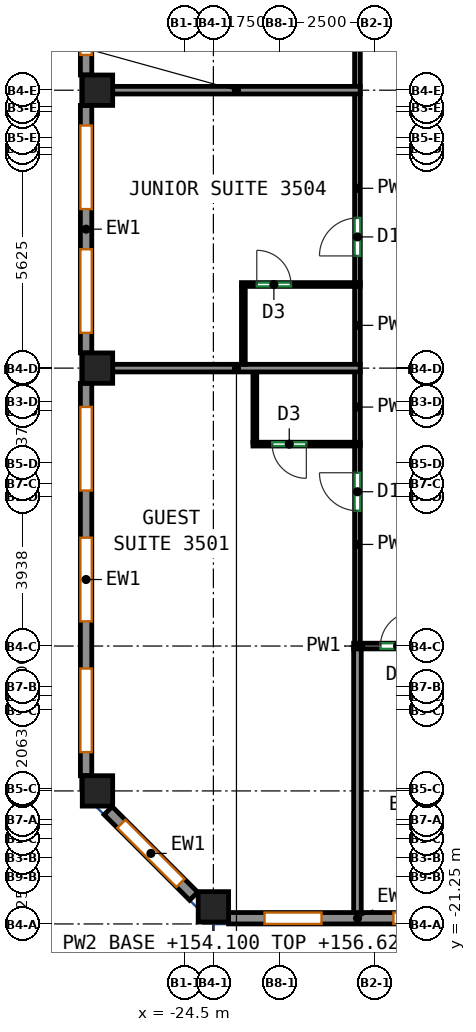
"""IFC4 building model, lengths in metres.
Left out: names, types, materials, properties, quantities, classifications, styles, units other than length and angle.
Written with IfcOpenShell. Run it as: python <this file> out.ifc"""

import sys

from ifc_helpers import new_model, si_unit, direction, frame, frame_2d, origin, origin_2d, place, context, subcontext, project, spatial, rectangle, extrude, source, transform, mapped, element, fill, save


model = new_model("IFC4")
c1 = context("Model", 3, precision=1e-05, world=origin(), true_north=direction((0.0, 1.0)))
c2 = subcontext(c1, "Body", "Model", "MODEL_VIEW")
j1 = project(units=[si_unit("LENGTHUNIT", "METRE"), si_unit("PLANEANGLEUNIT", "RADIAN")], contexts=[c1])
p1 = place(None, origin())
s1 = spatial("IfcSite", under=j1, at=p1, CompositionType="ELEMENT")
p2 = place(p1, origin())
s2 = spatial("IfcBuilding", under=s1, at=p2, CompositionType="ELEMENT")
p3 = place(p2, frame((0.0, 0.0, 154.1)))
s3 = spatial("IfcBuildingStorey", under=s2, at=p3, CompositionType="ELEMENT", Elevation=154.1)
m1 = source(origin(), c2, "Body", "SweptSolid", [
    extrude(rectangle(XDim=0.8, YDim=0.8, at=origin_2d()), origin(), (0.0, 0.0, 1.0), 3.12),
])
for number, where, z_axis, x_axis in (
    (1, (-26.8, -17.75, 0.0), (0.0, 0.0, 1.0), (1.0, 0.0, 0.0)),
    (2, (-26.8, -6.625, 0.0), (0.0, 0.0, 1.0), (1.0, 0.0, 0.0)),
    (3, (-26.8, 0.688, 0.0), (0.0, 0.0, 1.0), (1.0, 0.0, 0.0)),
    (4, (-23.75, -20.8, 0.0), (0.0, 0.0, 1.0), (1.0, 0.0, 0.0)),
):
    element("IfcColumn", number, at=place(p3, frame(where, z_axis=z_axis, x_axis=x_axis)), inside=s3, PredefinedType="COLUMN", context=c2, shape_type="MappedRepresentation", body=[
        mapped(m1, transform((0.0, 0.0, 0.0))),
    ])
m2 = source(origin(), c2, "Body", "SweptSolid", [
    extrude(rectangle(XDim=6.783, YDim=0.3, at=frame_2d((3.392, 0.0))), origin(), (0.0, 0.0, 1.0), 3.12),
])
p4 = place(p3, frame((-23.35, -21.1, 0.0), z_axis=(0.0, 0.0, 1.0), x_axis=(1.0, 0.0, 0.0)))
e5 = element("IfcWall", 5, at=p4, inside=s3, PredefinedType="SOLIDWALL", context=c2, shape_type="MappedRepresentation", body=[
    mapped(m2, transform((0.0, 0.0, 0.0))),
])
p5 = place(p4, frame((0.946, 0.0, 0.85)))
e6 = element("IfcOpeningElement", 6, at=p5, cuts=e5, PredefinedType="OPENING", context=c2, shape_type="SweptSolid", body=[
    extrude(rectangle(XDim=1.5, YDim=1.95, at=frame_2d((0.75, 0.975))), frame((0.0, 0.16, 0.0), z_axis=(0.0, -1.0, 0.0), x_axis=(1.0, 0.0, 0.0)), (0.0, 0.0, 1.0), 0.32),
])
p6 = place(p4, frame((4.337, 0.0, 0.85)))
e7 = element("IfcOpeningElement", 7, at=p6, cuts=e5, PredefinedType="OPENING", context=c2, shape_type="SweptSolid", body=[
    extrude(rectangle(XDim=1.5, YDim=1.95, at=frame_2d((0.75, 0.975))), frame((0.0, 0.16, 0.0), z_axis=(0.0, -1.0, 0.0), x_axis=(1.0, 0.0, 0.0)), (0.0, 0.0, 1.0), 0.32),
])
m3 = source(origin(), c2, "Body", "SweptSolid", [
    extrude(rectangle(XDim=6.513, YDim=0.3, at=frame_2d((3.256, 0.0))), origin(), (0.0, 0.0, 1.0), 3.12),
])
p7 = place(p3, frame((-27.1, 7.6, 0.0), z_axis=(0.0, 0.0, 1.0), x_axis=(0.0, -1.0, 0.0)))
e8 = element("IfcWall", 8, at=p7, inside=s3, PredefinedType="SOLIDWALL", context=c2, shape_type="MappedRepresentation", body=[
    mapped(m3, transform((0.0, 0.0, 0.0))),
])
p8 = place(p7, frame((0.528, 0.0, 0.85)))
e9 = element("IfcOpeningElement", 9, at=p8, cuts=e8, PredefinedType="OPENING", context=c2, shape_type="SweptSolid", body=[
    extrude(rectangle(XDim=2.2, YDim=1.95, at=frame_2d((1.1, 0.975))), frame((0.0, 0.16, 0.0), z_axis=(0.0, -1.0, 0.0), x_axis=(1.0, 0.0, 0.0)), (0.0, 0.0, 1.0), 0.32),
])
p9 = place(p7, frame((3.784, 0.0, 0.85)))
e10 = element("IfcOpeningElement", 10, at=p9, cuts=e8, PredefinedType="OPENING", context=c2, shape_type="SweptSolid", body=[
    extrude(rectangle(XDim=2.2, YDim=1.95, at=frame_2d((1.1, 0.975))), frame((0.0, 0.16, 0.0), z_axis=(0.0, -1.0, 0.0), x_axis=(1.0, 0.0, 0.0)), (0.0, 0.0, 1.0), 0.32),
])
p10 = place(p3, frame((-27.1, 0.288, 0.0), z_axis=(0.0, 0.0, 1.0), x_axis=(0.0, -1.0, 0.0)))
e11 = element("IfcWall", 11, at=p10, inside=s3, PredefinedType="SOLIDWALL", context=c2, shape_type="MappedRepresentation", body=[
    mapped(m3, transform((0.0, 0.0, 0.0))),
])
p11 = place(p10, frame((0.528, 0.0, 0.85)))
e12 = element("IfcOpeningElement", 12, at=p11, cuts=e11, PredefinedType="OPENING", context=c2, shape_type="SweptSolid", body=[
    extrude(rectangle(XDim=2.2, YDim=1.95, at=frame_2d((1.1, 0.975))), frame((0.0, 0.16, 0.0), z_axis=(0.0, -1.0, 0.0), x_axis=(1.0, 0.0, 0.0)), (0.0, 0.0, 1.0), 0.32),
])
p12 = place(p10, frame((3.784, 0.0, 0.85)))
e13 = element("IfcOpeningElement", 13, at=p12, cuts=e11, PredefinedType="OPENING", context=c2, shape_type="SweptSolid", body=[
    extrude(rectangle(XDim=2.2, YDim=1.95, at=frame_2d((1.1, 0.975))), frame((0.0, 0.16, 0.0), z_axis=(0.0, -1.0, 0.0), x_axis=(1.0, 0.0, 0.0)), (0.0, 0.0, 1.0), 0.32),
])
m4 = source(origin(), c2, "Body", "SweptSolid", [
    extrude(rectangle(XDim=10.325, YDim=0.3, at=frame_2d((5.163, 0.0))), origin(), (0.0, 0.0, 1.0), 3.12),
])
p13 = place(p3, frame((-27.1, -7.025, 0.0), z_axis=(0.0, 0.0, 1.0), x_axis=(0.0, -1.0, 0.0)))
e14 = element("IfcWall", 14, at=p13, inside=s3, PredefinedType="SOLIDWALL", context=c2, shape_type="MappedRepresentation", body=[
    mapped(m4, transform((0.0, 0.0, 0.0))),
])
p14 = place(p13, frame((0.621, 0.0, 0.85)))
e15 = element("IfcOpeningElement", 15, at=p14, cuts=e14, PredefinedType="OPENING", context=c2, shape_type="SweptSolid", body=[
    extrude(rectangle(XDim=2.2, YDim=1.95, at=frame_2d((1.1, 0.975))), frame((0.0, 0.16, 0.0), z_axis=(0.0, -1.0, 0.0), x_axis=(1.0, 0.0, 0.0)), (0.0, 0.0, 1.0), 0.32),
])
p15 = place(p13, frame((4.062, 0.0, 0.85)))
e16 = element("IfcOpeningElement", 16, at=p15, cuts=e14, PredefinedType="OPENING", context=c2, shape_type="SweptSolid", body=[
    extrude(rectangle(XDim=2.2, YDim=1.95, at=frame_2d((1.1, 0.975))), frame((0.0, 0.16, 0.0), z_axis=(0.0, -1.0, 0.0), x_axis=(1.0, 0.0, 0.0)), (0.0, 0.0, 1.0), 0.32),
])
p16 = place(p13, frame((7.504, 0.0, 0.85)))
e17 = element("IfcOpeningElement", 17, at=p16, cuts=e14, PredefinedType="OPENING", context=c2, shape_type="SweptSolid", body=[
    extrude(rectangle(XDim=2.2, YDim=1.95, at=frame_2d((1.1, 0.975))), frame((0.0, 0.16, 0.0), z_axis=(0.0, -1.0, 0.0), x_axis=(1.0, 0.0, 0.0)), (0.0, 0.0, 1.0), 0.32),
])
m5 = source(origin(), c2, "Body", "SweptSolid", [
    extrude(rectangle(XDim=3.182, YDim=0.3, at=frame_2d((1.591, 0.0))), origin(), (0.0, 0.0, 1.0), 3.12),
])
p17 = place(p3, frame((-26.519, -18.269, 0.0), z_axis=(0.0, 0.0, 1.0), x_axis=(0.707068419229, -0.707145141063, 0.0)))
e18 = element("IfcWall", 18, at=p17, inside=s3, PredefinedType="SOLIDWALL", context=c2, shape_type="MappedRepresentation", body=[
    mapped(m5, transform((0.0, 0.0, 0.0))),
])
p18 = place(p17, frame((0.491, 0.0, 0.85)))
e19 = element("IfcOpeningElement", 19, at=p18, cuts=e18, PredefinedType="OPENING", context=c2, shape_type="SweptSolid", body=[
    extrude(rectangle(XDim=2.2, YDim=1.95, at=frame_2d((1.1, 0.975))), frame((0.0, 0.16, 0.0), z_axis=(0.0, -1.0, 0.0), x_axis=(1.0, 0.0, 0.0)), (0.0, 0.0, 1.0), 0.32),
])
p19 = place(p3, frame((-20.059, -13.938, 0.0), z_axis=(0.0, 0.0, 1.0), x_axis=(1.0, 0.0, 0.0)))
e20 = element("IfcWall", 20, at=p19, inside=s3, PredefinedType="PARTITIONING", context=c2, shape_type="SweptSolid", body=[
    extrude(rectangle(XDim=2.309, YDim=0.15, at=frame_2d((1.155, 0.0))), origin(), (0.0, 0.0, 1.0), 3.12),
])
p20 = place(p19, frame((0.705, 0.0, 0.0)))
e21 = element("IfcOpeningElement", 21, at=p20, cuts=e20, PredefinedType="OPENING", context=c2, shape_type="SweptSolid", body=[
    extrude(rectangle(XDim=0.9, YDim=2.1, at=frame_2d((0.45, 1.05))), frame((0.0, 0.085, 0.0), z_axis=(0.0, -1.0, 0.0), x_axis=(1.0, 0.0, 0.0)), (0.0, 0.0, 1.0), 0.17),
])
p21 = place(p3, frame((-19.959, -13.863, 0.0), z_axis=(0.0, 0.0, 1.0), x_axis=(0.0, 1.0, 0.0)))
e22 = element("IfcWall", 22, at=p21, inside=s3, PredefinedType="PARTITIONING", context=c2, shape_type="SweptSolid", body=[
    extrude(rectangle(XDim=5.198, YDim=0.15, at=frame_2d((2.599, 0.0))), origin(), (0.0, 0.0, 1.0), 3.12),
])
p22 = place(p21, frame((3.485, 0.0, 0.0)))
e23 = element("IfcOpeningElement", 23, at=p22, cuts=e22, PredefinedType="OPENING", context=c2, shape_type="SweptSolid", body=[
    extrude(rectangle(XDim=1.0, YDim=2.1, at=frame_2d((0.5, 1.05))), frame((0.0, 0.085, 0.0), z_axis=(0.0, -1.0, 0.0), x_axis=(1.0, 0.0, 0.0)), (0.0, 0.0, 1.0), 0.17),
])
p23 = place(p3, frame((-19.959, -8.585, 0.0), z_axis=(0.0, 0.0, 1.0), x_axis=(0.0, 1.0, 0.0)))
e24 = element("IfcWall", 24, at=p23, inside=s3, PredefinedType="PARTITIONING", context=c2, shape_type="SweptSolid", body=[
    extrude(rectangle(XDim=1.87, YDim=0.15, at=frame_2d((0.935, 0.0))), origin(), (0.0, 0.0, 1.0), 3.12),
])
p24 = place(p3, frame((-19.959, -4.385, 0.0), z_axis=(0.0, 0.0, 1.0), x_axis=(0.0, 1.0, 0.0)))
e25 = element("IfcWall", 25, at=p24, inside=s3, PredefinedType="PARTITIONING", context=c2, shape_type="SweptSolid", body=[
    extrude(rectangle(XDim=4.983, YDim=0.15, at=frame_2d((2.491, 0.0))), origin(), (0.0, 0.0, 1.0), 3.12),
])
p25 = place(p24, frame((0.712, 0.0, 0.0)))
e26 = element("IfcOpeningElement", 26, at=p25, cuts=e25, PredefinedType="OPENING", context=c2, shape_type="SweptSolid", body=[
    extrude(rectangle(XDim=1.0, YDim=2.1, at=frame_2d((0.5, 1.05))), frame((0.0, 0.085, 0.0), z_axis=(0.0, -1.0, 0.0), x_axis=(1.0, 0.0, 0.0)), (0.0, 0.0, 1.0), 0.17),
])
p26 = place(p3, frame((-19.959, -6.535, 0.0), z_axis=(0.0, 0.0, 1.0), x_axis=(0.0, 1.0, 0.0)))
e27 = element("IfcWall", 27, at=p26, inside=s3, PredefinedType="PARTITIONING", context=c2, shape_type="SweptSolid", body=[
    extrude(rectangle(XDim=2.07, YDim=0.15, at=frame_2d((1.035, 0.0))), origin(), (0.0, 0.0, 1.0), 3.12),
])
p27 = place(p3, frame((-19.959, 0.778, 0.0), z_axis=(0.0, 0.0, 1.0), x_axis=(0.0, 1.0, 0.0)))
e28 = element("IfcWall", 28, at=p27, inside=s3, PredefinedType="PARTITIONING", context=c2, shape_type="SweptSolid", body=[
    extrude(rectangle(XDim=4.982, YDim=0.15, at=frame_2d((2.491, 0.0))), origin(), (0.0, 0.0, 1.0), 3.12),
])
p28 = place(p27, frame((3.782, 0.0, 0.0)))
e29 = element("IfcOpeningElement", 29, at=p28, cuts=e28, PredefinedType="OPENING", context=c2, shape_type="SweptSolid", body=[
    extrude(rectangle(XDim=1.0, YDim=2.1, at=frame_2d((0.5, 1.05))), frame((0.0, 0.085, 0.0), z_axis=(0.0, -1.0, 0.0), x_axis=(1.0, 0.0, 0.0)), (0.0, 0.0, 1.0), 0.17),
])
p29 = place(p3, frame((-19.959, -21.0, 0.0), z_axis=(0.0, 0.0, 1.0), x_axis=(0.0, 1.0, 0.0)))
e30 = element("IfcWall", 30, at=p29, inside=s3, PredefinedType="PARTITIONING", context=c2, shape_type="SweptSolid", body=[
    extrude(rectangle(XDim=6.985, YDim=0.2, at=frame_2d((3.493, 0.0))), origin(), (0.0, 0.0, 1.0), 3.12),
])
p30 = place(p3, frame((-22.659, -8.575, 0.0), z_axis=(0.0, 0.0, 1.0), x_axis=(0.0, 1.0, 0.0)))
e31 = element("IfcWall", 31, at=p30, inside=s3, PredefinedType="PARTITIONING", context=c2, shape_type="SweptSolid", body=[
    extrude(rectangle(XDim=1.85, YDim=0.1, at=frame_2d((0.925, 0.0))), origin(), (0.0, 0.0, 1.0), 3.12),
])
p31 = place(p3, frame((-19.886, -8.625, 0.0), z_axis=(0.0, 0.0, 1.0), x_axis=(-1.0, 0.0, 0.0)))
e32 = element("IfcWall", 32, at=p31, inside=s3, PredefinedType="PARTITIONING", context=c2, shape_type="SweptSolid", body=[
    extrude(rectangle(XDim=2.823, YDim=0.1, at=frame_2d((1.412, 0.0))), origin(), (0.0, 0.0, 1.0), 3.12),
])
p32 = place(p31, frame((1.418, 0.0, 0.0)))
e33 = element("IfcOpeningElement", 33, at=p32, cuts=e32, PredefinedType="OPENING", context=c2, shape_type="SweptSolid", body=[
    extrude(rectangle(XDim=0.9, YDim=2.1, at=frame_2d((0.45, 1.05))), frame((0.0, 0.06, 0.0), z_axis=(0.0, -1.0, 0.0), x_axis=(1.0, 0.0, 0.0)), (0.0, 0.0, 1.0), 0.12),
])
p33 = place(p3, frame((-26.4, -6.625, 0.0), z_axis=(0.0, 0.0, 1.0), x_axis=(1.0, 0.0, 0.0)))
e34 = element("IfcWall", 34, at=p33, inside=s3, PredefinedType="PARTITIONING", context=c2, shape_type="SweptSolid", body=[
    extrude(rectangle(XDim=6.514, YDim=0.2, at=frame_2d((3.257, 0.0))), origin(), (0.0, 0.0, 1.0), 2.52),
])
p34 = place(p3, frame((-22.961, -6.525, 0.0), z_axis=(0.0, 0.0, 1.0), x_axis=(0.0, 1.0, 0.0)))
e35 = element("IfcWall", 35, at=p34, inside=s3, PredefinedType="PARTITIONING", context=c2, shape_type="SweptSolid", body=[
    extrude(rectangle(XDim=2.05, YDim=0.1, at=frame_2d((1.025, 0.0))), origin(), (0.0, 0.0, 1.0), 3.12),
])
p35 = place(p3, frame((-23.011, -4.425, 0.0), z_axis=(0.0, 0.0, 1.0), x_axis=(1.0, 0.0, 0.0)))
e36 = element("IfcWall", 36, at=p35, inside=s3, PredefinedType="PARTITIONING", context=c2, shape_type="SweptSolid", body=[
    extrude(rectangle(XDim=3.125, YDim=0.1, at=frame_2d((1.562, 0.0))), origin(), (0.0, 0.0, 1.0), 3.12),
])
p36 = place(p35, frame((0.403, 0.0, 0.0)))
e37 = element("IfcOpeningElement", 37, at=p36, cuts=e36, PredefinedType="OPENING", context=c2, shape_type="SweptSolid", body=[
    extrude(rectangle(XDim=0.9, YDim=2.1, at=frame_2d((0.45, 1.05))), frame((0.0, 0.06, 0.0), z_axis=(0.0, -1.0, 0.0), x_axis=(1.0, 0.0, 0.0)), (0.0, 0.0, 1.0), 0.12),
])
p37 = place(p3, frame((-26.4, 0.688, 0.0), z_axis=(0.0, 0.0, 1.0), x_axis=(1.0, 0.0, 0.0)))
e38 = element("IfcWall", 38, at=p37, inside=s3, PredefinedType="PARTITIONING", context=c2, shape_type="SweptSolid", body=[
    extrude(rectangle(XDim=6.514, YDim=0.2, at=frame_2d((3.257, 0.0))), origin(), (0.0, 0.0, 1.0), 2.52),
])
p38 = place(p5, origin())
e39 = element("IfcWindow", 39, at=p38, inside=s3, PartitioningType="SINGLE_PANEL", PredefinedType="WINDOW", context=c2, shape_type="SweptSolid", body=[
    extrude(rectangle(XDim=1.5, YDim=1.95, at=frame_2d((0.75, 0.975))), frame((0.0, 0.03, 0.0), z_axis=(0.0, -1.0, 0.0), x_axis=(1.0, 0.0, 0.0)), (0.0, 0.0, 1.0), 0.06),
])
fill(e6, e39)
p39 = place(p6, origin())
e40 = element("IfcWindow", 40, at=p39, inside=s3, PartitioningType="SINGLE_PANEL", PredefinedType="WINDOW", context=c2, shape_type="SweptSolid", body=[
    extrude(rectangle(XDim=1.5, YDim=1.95, at=frame_2d((0.75, 0.975))), frame((0.0, 0.03, 0.0), z_axis=(0.0, -1.0, 0.0), x_axis=(1.0, 0.0, 0.0)), (0.0, 0.0, 1.0), 0.06),
])
fill(e7, e40)
p40 = place(p9, origin())
e41 = element("IfcWindow", 41, at=p40, inside=s3, PartitioningType="SINGLE_PANEL", PredefinedType="WINDOW", context=c2, shape_type="SweptSolid", body=[
    extrude(rectangle(XDim=2.2, YDim=1.95, at=frame_2d((1.1, 0.975))), frame((0.0, 0.03, 0.0), z_axis=(0.0, -1.0, 0.0), x_axis=(1.0, 0.0, 0.0)), (0.0, 0.0, 1.0), 0.06),
])
fill(e10, e41)
p41 = place(p11, origin())
e42 = element("IfcWindow", 42, at=p41, inside=s3, PartitioningType="SINGLE_PANEL", PredefinedType="WINDOW", context=c2, shape_type="SweptSolid", body=[
    extrude(rectangle(XDim=2.2, YDim=1.95, at=frame_2d((1.1, 0.975))), frame((0.0, 0.03, 0.0), z_axis=(0.0, -1.0, 0.0), x_axis=(1.0, 0.0, 0.0)), (0.0, 0.0, 1.0), 0.06),
])
fill(e12, e42)
p42 = place(p12, origin())
e43 = element("IfcWindow", 43, at=p42, inside=s3, PartitioningType="SINGLE_PANEL", PredefinedType="WINDOW", context=c2, shape_type="SweptSolid", body=[
    extrude(rectangle(XDim=2.2, YDim=1.95, at=frame_2d((1.1, 0.975))), frame((0.0, 0.03, 0.0), z_axis=(0.0, -1.0, 0.0), x_axis=(1.0, 0.0, 0.0)), (0.0, 0.0, 1.0), 0.06),
])
fill(e13, e43)
p43 = place(p14, origin())
e44 = element("IfcWindow", 44, at=p43, inside=s3, PartitioningType="SINGLE_PANEL", PredefinedType="WINDOW", context=c2, shape_type="SweptSolid", body=[
    extrude(rectangle(XDim=2.2, YDim=1.95, at=frame_2d((1.1, 0.975))), frame((0.0, 0.03, 0.0), z_axis=(0.0, -1.0, 0.0), x_axis=(1.0, 0.0, 0.0)), (0.0, 0.0, 1.0), 0.06),
])
fill(e15, e44)
p44 = place(p15, origin())
e45 = element("IfcWindow", 45, at=p44, inside=s3, PartitioningType="SINGLE_PANEL", PredefinedType="WINDOW", context=c2, shape_type="SweptSolid", body=[
    extrude(rectangle(XDim=2.2, YDim=1.95, at=frame_2d((1.1, 0.975))), frame((0.0, 0.03, 0.0), z_axis=(0.0, -1.0, 0.0), x_axis=(1.0, 0.0, 0.0)), (0.0, 0.0, 1.0), 0.06),
])
fill(e16, e45)
p45 = place(p16, origin())
e46 = element("IfcWindow", 46, at=p45, inside=s3, PartitioningType="SINGLE_PANEL", PredefinedType="WINDOW", context=c2, shape_type="SweptSolid", body=[
    extrude(rectangle(XDim=2.2, YDim=1.95, at=frame_2d((1.1, 0.975))), frame((0.0, 0.03, 0.0), z_axis=(0.0, -1.0, 0.0), x_axis=(1.0, 0.0, 0.0)), (0.0, 0.0, 1.0), 0.06),
])
fill(e17, e46)
p46 = place(p18, origin())
e47 = element("IfcWindow", 47, at=p46, inside=s3, PartitioningType="SINGLE_PANEL", PredefinedType="WINDOW", context=c2, shape_type="SweptSolid", body=[
    extrude(rectangle(XDim=2.2, YDim=1.95, at=frame_2d((1.1, 0.975))), frame((0.0, 0.03, 0.0), z_axis=(0.0, -1.0, 0.0), x_axis=(1.0, 0.0, 0.0)), (0.0, 0.0, 1.0), 0.06),
])
fill(e19, e47)
p47 = place(p20, origin())
e48 = element("IfcDoor", 48, at=p47, inside=s3, OperationType="SINGLE_SWING_RIGHT", PredefinedType="DOOR", context=c2, shape_type="SweptSolid", body=[
    extrude(rectangle(XDim=0.9, YDim=2.1, at=frame_2d((0.45, 1.05))), frame((0.0, 0.025, 0.0), z_axis=(0.0, -1.0, 0.0), x_axis=(1.0, 0.0, 0.0)), (0.0, 0.0, 1.0), 0.05),
])
fill(e21, e48)
p48 = place(p22, origin())
e49 = element("IfcDoor", 49, at=p48, inside=s3, OperationType="SINGLE_SWING_RIGHT", PredefinedType="DOOR", context=c2, shape_type="SweptSolid", body=[
    extrude(rectangle(XDim=1.0, YDim=2.1, at=frame_2d((0.5, 1.05))), frame((0.0, 0.025, 0.0), z_axis=(0.0, -1.0, 0.0), x_axis=(1.0, 0.0, 0.0)), (0.0, 0.0, 1.0), 0.05),
])
fill(e23, e49)
p49 = place(p32, origin())
e50 = element("IfcDoor", 50, at=p49, inside=s3, OperationType="SINGLE_SWING_LEFT", PredefinedType="DOOR", context=c2, shape_type="SweptSolid", body=[
    extrude(rectangle(XDim=0.9, YDim=2.1, at=frame_2d((0.45, 1.05))), frame((0.0, 0.025, 0.0), z_axis=(0.0, -1.0, 0.0), x_axis=(1.0, 0.0, 0.0)), (0.0, 0.0, 1.0), 0.05),
])
fill(e33, e50)
p50 = place(p36, origin())
e51 = element("IfcDoor", 51, at=p50, inside=s3, OperationType="SINGLE_SWING_LEFT", PredefinedType="DOOR", context=c2, shape_type="SweptSolid", body=[
    extrude(rectangle(XDim=0.9, YDim=2.1, at=frame_2d((0.45, 1.05))), frame((0.0, 0.025, 0.0), z_axis=(0.0, -1.0, 0.0), x_axis=(1.0, 0.0, 0.0)), (0.0, 0.0, 1.0), 0.05),
])
fill(e37, e51)
p51 = place(p25, origin())
e52 = element("IfcDoor", 52, at=p51, inside=s3, OperationType="SINGLE_SWING_LEFT", PredefinedType="DOOR", context=c2, shape_type="SweptSolid", body=[
    extrude(rectangle(XDim=1.0, YDim=2.1, at=frame_2d((0.5, 1.05))), frame((0.0, 0.025, 0.0), z_axis=(0.0, -1.0, 0.0), x_axis=(1.0, 0.0, 0.0)), (0.0, 0.0, 1.0), 0.05),
])
fill(e26, e52)
save(model, sys.argv[1])
